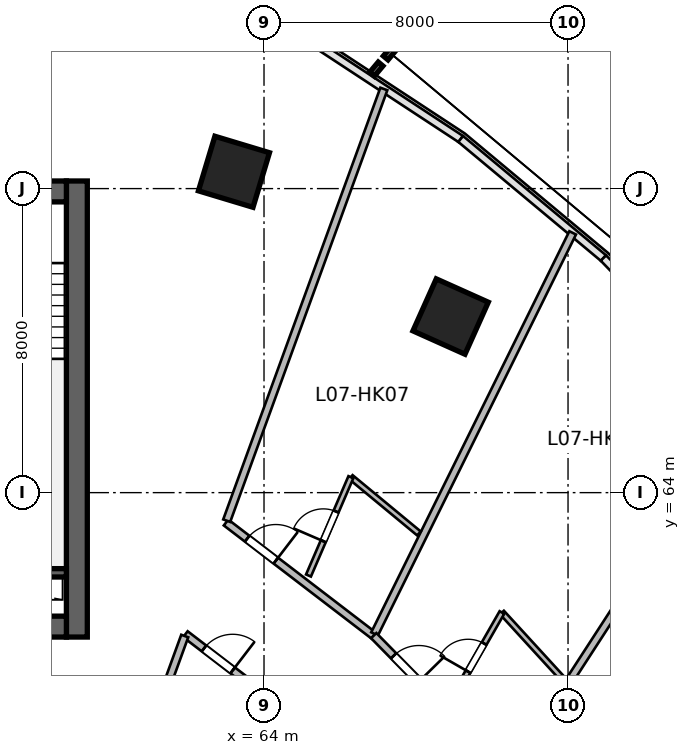
"""IFC4 building model, lengths in metres.
Left out: names, types, materials, properties, quantities, classifications, styles, units other than length and angle.
Written with IfcOpenShell. Run it as: python <this file> out.ifc"""

import sys

from ifc_helpers import new_model, si_unit, direction, frame, frame_2d, origin, origin_2d, place, context, subcontext, project, spatial, rectangle, extrude, source, transform, mapped, element, fill, save


model = new_model("IFC4")
c1 = context("Model", 3, precision=1e-05, world=origin(), true_north=direction((0.0, 1.0)))
c2 = subcontext(c1, "Body", "Model", "MODEL_VIEW")
j1 = project(units=[si_unit("LENGTHUNIT", "METRE"), si_unit("PLANEANGLEUNIT", "RADIAN")], contexts=[c1])
p1 = place(None, origin())
s1 = spatial("IfcSite", under=j1, at=p1, CompositionType="ELEMENT")
p2 = place(p1, origin())
s2 = spatial("IfcBuilding", under=s1, at=p2, CompositionType="ELEMENT")
p3 = place(p2, frame((0.0, 0.0, 39.0)))
s3 = spatial("IfcBuildingStorey", under=s2, at=p3, CompositionType="ELEMENT", Elevation=39.0)
m1 = source(origin(), c2, "Body", "SweptSolid", [
    extrude(rectangle(XDim=12.0, YDim=0.55, at=frame_2d((6.0, 0.0))), origin(), (0.0, 0.0, 1.0), 3.6),
])
p4 = place(p3, frame((59.075, 60.2, 0.0), z_axis=(0.0, 0.0, 1.0), x_axis=(0.0, 1.0, 0.0)))
e1 = element("IfcWall", 1, at=p4, inside=s3, PredefinedType="SHEAR", context=c2, shape_type="MappedRepresentation", body=[
    mapped(m1, transform((0.0, 0.0, 0.0), scale=1.0)),
])
m2 = source(origin(), c2, "Body", "SweptSolid", [
    extrude(rectangle(XDim=21.6, YDim=0.55, at=frame_2d((10.8, 0.0))), origin(), (0.0, 0.0, 1.0), 3.6),
])
p5 = place(p3, frame((37.2, 60.475, 0.0), z_axis=(0.0, 0.0, 1.0), x_axis=(1.0, 0.0, 0.0)))
e2 = element("IfcWall", 2, at=p5, inside=s3, PredefinedType="SHEAR", context=c2, shape_type="MappedRepresentation", body=[
    mapped(m2, transform((0.0, 0.0, 0.0), scale=1.0)),
])
p6 = place(p5, frame((1.1, 0.0, 0.0)))
e3 = element("IfcOpeningElement", 3, at=p6, cuts=e2, PredefinedType="OPENING", context=c2, shape_type="SweptSolid", body=[
    extrude(rectangle(XDim=1.15, YDim=2.15, at=frame_2d((0.575, 1.075))), frame((0.0, 0.285, 0.0), z_axis=(0.0, -1.0, 0.0), x_axis=(1.0, 0.0, 0.0)), (0.0, 0.0, 1.0), 0.57),
])
p7 = place(p5, frame((19.5, 0.0, 0.0)))
e4 = element("IfcOpeningElement", 4, at=p7, cuts=e2, PredefinedType="OPENING", context=c2, shape_type="SweptSolid", body=[
    extrude(rectangle(XDim=0.9, YDim=2.1, at=frame_2d((0.45, 1.05))), frame((0.0, 0.285, 0.0), z_axis=(0.0, -1.0, 0.0), x_axis=(1.0, 0.0, 0.0)), (0.0, 0.0, 1.0), 0.57),
])
p8 = place(p5, frame((12.02, 0.0, 0.0)))
e5 = element("IfcOpeningElement", 5, at=p8, cuts=e2, PredefinedType="OPENING", context=c2, shape_type="SweptSolid", body=[
    extrude(rectangle(XDim=1.6, YDim=2.15, at=frame_2d((0.8, 1.075))), frame((0.0, 0.285, 0.0), z_axis=(0.0, -1.0, 0.0), x_axis=(1.0, 0.0, 0.0)), (0.0, 0.0, 1.0), 0.57),
])
p9 = place(p3, frame((37.2, 71.925, 0.0), z_axis=(0.0, 0.0, 1.0), x_axis=(1.0, 0.0, 0.0)))
e6 = element("IfcWall", 6, at=p9, inside=s3, PredefinedType="SHEAR", context=c2, shape_type="MappedRepresentation", body=[
    mapped(m2, transform((0.0, 0.0, 0.0), scale=1.0)),
])
p10 = place(p9, frame((1.2, 0.0, 0.0)))
e7 = element("IfcOpeningElement", 7, at=p10, cuts=e6, PredefinedType="OPENING", context=c2, shape_type="SweptSolid", body=[
    extrude(rectangle(XDim=0.9, YDim=2.1, at=frame_2d((0.45, 1.05))), frame((0.0, 0.285, 0.0), z_axis=(0.0, -1.0, 0.0), x_axis=(1.0, 0.0, 0.0)), (0.0, 0.0, 1.0), 0.57),
])
p11 = place(p9, frame((14.7, 0.0, 0.0)))
e8 = element("IfcOpeningElement", 8, at=p11, cuts=e6, PredefinedType="OPENING", context=c2, shape_type="SweptSolid", body=[
    extrude(rectangle(XDim=1.2, YDim=2.15, at=frame_2d((0.6, 1.075))), frame((0.0, 0.285, 0.0), z_axis=(0.0, -1.0, 0.0), x_axis=(1.0, 0.0, 0.0)), (0.0, 0.0, 1.0), 0.57),
])
p12 = place(p9, frame((4.15, 0.0, 0.0)))
e9 = element("IfcOpeningElement", 9, at=p12, cuts=e6, PredefinedType="OPENING", context=c2, shape_type="SweptSolid", body=[
    extrude(rectangle(XDim=1.3, YDim=2.15, at=frame_2d((0.65, 1.075))), frame((0.0, 0.285, 0.0), z_axis=(0.0, -1.0, 0.0), x_axis=(1.0, 0.0, 0.0)), (0.0, 0.0, 1.0), 0.57),
])
p13 = place(p9, frame((7.1, 0.0, 0.0)))
e10 = element("IfcOpeningElement", 10, at=p13, cuts=e6, PredefinedType="OPENING", context=c2, shape_type="SweptSolid", body=[
    extrude(rectangle(XDim=0.9, YDim=2.1, at=frame_2d((0.45, 1.05))), frame((0.0, 0.285, 0.0), z_axis=(0.0, -1.0, 0.0), x_axis=(1.0, 0.0, 0.0)), (0.0, 0.0, 1.0), 0.57),
])
m3 = source(origin(), c2, "Body", "SweptSolid", [
    extrude(rectangle(XDim=3.27, YDim=0.22, at=frame_2d((1.635, 0.0))), origin(), (0.0, 0.0, 1.0), 3.6),
])
p14 = place(p3, frame((55.53, 61.89, 0.0), z_axis=(0.0, 0.0, 1.0), x_axis=(1.0, 0.0, 0.0)))
e11 = element("IfcWall", 11, at=p14, inside=s3, PredefinedType="SHEAR", context=c2, shape_type="MappedRepresentation", body=[
    mapped(m3, transform((0.0, 0.0, 0.0), scale=1.0)),
])
m4 = source(origin(), c2, "Body", "SweptSolid", [
    extrude(rectangle(XDim=1.5, YDim=1.5, at=origin_2d()), origin(), (0.0, 0.0, 1.0), 3.6),
])
for number, where, z_axis, x_axis in (
    (12, (63.209, 72.442, 0.0), (0.0, 0.0, 1.0), (0.289, 0.957, 0.0)),
    (13, (68.91, 68.633, 0.0), (0.0, 0.0, 1.0), (0.409, 0.912, 0.0)),
):
    element("IfcColumn", number, at=place(p3, frame(where, z_axis=z_axis, x_axis=x_axis)), inside=s3, PredefinedType="COLUMN", context=c2, shape_type="MappedRepresentation", body=[
        mapped(m4, transform((0.0, 0.0, 0.0), scale=1.0)),
    ])
m5 = source(origin(), c2, "Body", "SweptSolid", [
    extrude(rectangle(XDim=4.895, YDim=0.195, at=frame_2d((2.447, 0.0))), origin(), (0.0, 0.0, 1.0), 3.36),
])
p15 = place(p3, frame((63.001, 63.214, 0.0), z_axis=(0.0, 0.0, 1.0), x_axis=(0.793896075849, -0.608053468661, 0.0)))
e14 = element("IfcWall", 14, at=p15, inside=s3, PredefinedType="PARTITIONING", context=c2, shape_type="MappedRepresentation", body=[
    mapped(m5, transform((0.0, 0.0, 0.0), scale=1.0)),
])
p16 = place(p15, frame((0.7, 0.0, 0.0)))
e15 = element("IfcOpeningElement", 15, at=p16, cuts=e14, PredefinedType="OPENING", context=c2, shape_type="SweptSolid", body=[
    extrude(rectangle(XDim=0.95, YDim=2.15, at=frame_2d((0.475, 1.075))), frame((0.0, 0.107, 0.0), z_axis=(0.0, -1.0, 0.0), x_axis=(1.0, 0.0, 0.0)), (0.0, 0.0, 1.0), 0.215),
])
m6 = source(origin(), c2, "Body", "SweptSolid", [
    extrude(rectangle(XDim=12.088, YDim=0.195, at=frame_2d((6.044, 0.0))), origin(), (0.0, 0.0, 1.0), 3.36),
])
p17 = place(p3, frame((63.019, 63.262, 0.0), z_axis=(0.0, 0.0, 1.0), x_axis=(0.34203007529, 0.939689005787, 0.0)))
e16 = element("IfcWall", 16, at=p17, inside=s3, PredefinedType="PARTITIONING", context=c2, shape_type="MappedRepresentation", body=[
    mapped(m6, transform((0.0, 0.0, 0.0), scale=1.0)),
])
m7 = source(origin(), c2, "Body", "SweptSolid", [
    extrude(rectangle(XDim=11.77, YDim=0.195, at=frame_2d((5.885, 0.0))), origin(), (0.0, 0.0, 1.0), 3.36),
])
p18 = place(p3, frame((66.909, 60.282, 0.0), z_axis=(0.0, 0.0, 1.0), x_axis=(0.44286060326, 0.896590478468, 0.0)))
e17 = element("IfcWall", 17, at=p18, inside=s3, PredefinedType="PARTITIONING", context=c2, shape_type="MappedRepresentation", body=[
    mapped(m7, transform((0.0, 0.0, 0.0), scale=1.0)),
])
m8 = source(origin(), c2, "Body", "SweptSolid", [
    extrude(rectangle(XDim=2.324, YDim=0.14, at=frame_2d((1.162, 0.0))), origin(), (0.0, 0.0, 1.0), 3.36),
])
p19 = place(p3, frame((66.286, 64.407, 0.0), z_axis=(0.0, 0.0, 1.0), x_axis=(0.770746444956, -0.637141991701, 0.0)))
e18 = element("IfcWall", 18, at=p19, inside=s3, PredefinedType="PARTITIONING", context=c2, shape_type="MappedRepresentation", body=[
    mapped(m8, transform((0.0, 0.0, 0.0), scale=1.0)),
])
m9 = source(origin(), c2, "Body", "SweptSolid", [
    extrude(rectangle(XDim=2.818, YDim=0.14, at=frame_2d((1.409, 0.0))), origin(), (0.0, 0.0, 1.0), 3.36),
])
p20 = place(p3, frame((65.17, 61.819, 0.0), z_axis=(0.0, 0.0, 1.0), x_axis=(0.395894859341, 0.918295845764, 0.0)))
e19 = element("IfcWall", 19, at=p20, inside=s3, PredefinedType="PARTITIONING", context=c2, shape_type="MappedRepresentation", body=[
    mapped(m9, transform((0.0, 0.0, 0.0), scale=1.0)),
])
p21 = place(p20, frame((0.984, 0.0, 0.0)))
e20 = element("IfcOpeningElement", 20, at=p21, cuts=e19, PredefinedType="OPENING", context=c2, shape_type="SweptSolid", body=[
    extrude(rectangle(XDim=0.85, YDim=2.05, at=frame_2d((0.425, 1.025))), frame((0.0, 0.08, 0.0), z_axis=(0.0, -1.0, 0.0), x_axis=(1.0, 0.0, 0.0)), (0.0, 0.0, 1.0), 0.16),
])
m10 = source(origin(), c2, "Body", "SweptSolid", [
    extrude(rectangle(XDim=4.546, YDim=0.195, at=frame_2d((2.273, 0.0))), origin(), (0.0, 0.0, 1.0), 3.36),
])
p22 = place(p3, frame((61.931, 60.275, 0.0), z_axis=(0.0, 0.0, 1.0), x_axis=(0.793907931297, -0.608037989457, 0.0)))
e21 = element("IfcWall", 21, at=p22, inside=s3, PredefinedType="PARTITIONING", context=c2, shape_type="MappedRepresentation", body=[
    mapped(m10, transform((0.0, 0.0, 0.0), scale=1.0)),
])
p23 = place(p22, frame((0.616, 0.0, 0.0)))
e22 = element("IfcOpeningElement", 22, at=p23, cuts=e21, PredefinedType="OPENING", context=c2, shape_type="SweptSolid", body=[
    extrude(rectangle(XDim=0.95, YDim=2.15, at=frame_2d((0.475, 1.075))), frame((0.0, 0.107, 0.0), z_axis=(0.0, -1.0, 0.0), x_axis=(1.0, 0.0, 0.0)), (0.0, 0.0, 1.0), 0.215),
])
m11 = source(origin(), c2, "Body", "SweptSolid", [
    extrude(rectangle(XDim=12.196, YDim=0.195, at=frame_2d((6.098, 0.0))), origin(), (0.0, 0.0, 1.0), 3.36),
])
p24 = place(p3, frame((57.742, 48.766, 0.0), z_axis=(0.0, 0.0, 1.0), x_axis=(0.342022711534, 0.939691686031, 0.0)))
e23 = element("IfcWall", 23, at=p24, inside=s3, PredefinedType="PARTITIONING", context=c2, shape_type="MappedRepresentation", body=[
    mapped(m11, transform((0.0, 0.0, 0.0), scale=1.0)),
])
m12 = source(origin(), c2, "Body", "SweptSolid", [
    extrude(rectangle(XDim=5.087, YDim=0.195, at=frame_2d((2.543, 0.0))), origin(), (0.0, 0.0, 1.0), 3.36),
])
p25 = place(p3, frame((66.887, 60.238, 0.0), z_axis=(0.0, 0.0, 1.0), x_axis=(0.700428330775, -0.7137227427, 0.0)))
e24 = element("IfcWall", 24, at=p25, inside=s3, PredefinedType="PARTITIONING", context=c2, shape_type="MappedRepresentation", body=[
    mapped(m12, transform((0.0, 0.0, 0.0), scale=1.0)),
])
p26 = place(p25, frame((0.746, 0.0, 0.0)))
e25 = element("IfcOpeningElement", 25, at=p26, cuts=e24, PredefinedType="OPENING", context=c2, shape_type="SweptSolid", body=[
    extrude(rectangle(XDim=0.95, YDim=2.15, at=frame_2d((0.475, 1.075))), frame((0.0, 0.107, 0.0), z_axis=(0.0, -1.0, 0.0), x_axis=(1.0, 0.0, 0.0)), (0.0, 0.0, 1.0), 0.215),
])
m13 = source(origin(), c2, "Body", "SweptSolid", [
    extrude(rectangle(XDim=11.403, YDim=0.195, at=frame_2d((5.701, 0.0))), origin(), (0.0, 0.0, 1.0), 3.36),
])
p27 = place(p3, frame((70.477, 56.647, 0.0), z_axis=(0.0, 0.0, 1.0), x_axis=(0.544246090008, 0.838925618581, 0.0)))
e26 = element("IfcWall", 26, at=p27, inside=s3, PredefinedType="PARTITIONING", context=c2, shape_type="MappedRepresentation", body=[
    mapped(m13, transform((0.0, 0.0, 0.0), scale=1.0)),
])
m14 = source(origin(), c2, "Body", "SweptSolid", [
    extrude(rectangle(XDim=2.416, YDim=0.14, at=frame_2d((1.208, 0.0))), origin(), (0.0, 0.0, 1.0), 3.36),
])
p28 = place(p3, frame((70.26, 60.846, 0.0), z_axis=(0.0, 0.0, 1.0), x_axis=(0.675399637907, -0.737451916476, 0.0)))
e27 = element("IfcWall", 27, at=p28, inside=s3, PredefinedType="PARTITIONING", context=c2, shape_type="MappedRepresentation", body=[
    mapped(m14, transform((0.0, 0.0, 0.0), scale=1.0)),
])
m15 = source(origin(), c2, "Body", "SweptSolid", [
    extrude(rectangle(XDim=2.732, YDim=0.14, at=frame_2d((1.366, 0.0))), origin(), (0.0, 0.0, 1.0), 3.36),
])
p29 = place(p3, frame((68.902, 58.476, 0.0), z_axis=(0.0, 0.0, 1.0), x_axis=(0.497254966372, 0.867604459658, 0.0)))
e28 = element("IfcWall", 28, at=p29, inside=s3, PredefinedType="PARTITIONING", context=c2, shape_type="MappedRepresentation", body=[
    mapped(m15, transform((0.0, 0.0, 0.0), scale=1.0)),
])
p30 = place(p29, frame((0.941, 0.0, 0.0)))
e29 = element("IfcOpeningElement", 29, at=p30, cuts=e28, PredefinedType="OPENING", context=c2, shape_type="SweptSolid", body=[
    extrude(rectangle(XDim=0.85, YDim=2.05, at=frame_2d((0.425, 1.025))), frame((0.0, 0.08, 0.0), z_axis=(0.0, -1.0, 0.0), x_axis=(1.0, 0.0, 0.0)), (0.0, 0.0, 1.0), 0.16),
])
m16 = source(origin(), c2, "Body", "SweptSolid", [
    extrude(rectangle(XDim=0.95, YDim=2.15, at=frame_2d((0.475, 1.075))), frame((0.0, 0.025, 0.0), z_axis=(0.0, -1.0, 0.0), x_axis=(1.0, 0.0, 0.0)), (0.0, 0.0, 1.0), 0.05),
])
p31 = place(p16, origin())
e30 = element("IfcDoor", 30, at=p31, inside=s3, OperationType="SINGLE_SWING_RIGHT", PredefinedType="DOOR", context=c2, shape_type="MappedRepresentation", body=[
    mapped(m16, transform((0.0, 0.0, 0.0), scale=1.0)),
])
fill(e15, e30)
m17 = source(origin(), c2, "Body", "SweptSolid", [
    extrude(rectangle(XDim=0.85, YDim=2.05, at=frame_2d((0.425, 1.025))), frame((0.0, 0.025, 0.0), z_axis=(0.0, -1.0, 0.0), x_axis=(1.0, 0.0, 0.0)), (0.0, 0.0, 1.0), 0.05),
])
p32 = place(p21, origin())
e31 = element("IfcDoor", 31, at=p32, inside=s3, OperationType="SINGLE_SWING_LEFT", PredefinedType="DOOR", context=c2, shape_type="MappedRepresentation", body=[
    mapped(m17, transform((0.0, 0.0, 0.0), scale=1.0)),
])
fill(e20, e31)
p33 = place(p23, origin())
e32 = element("IfcDoor", 32, at=p33, inside=s3, OperationType="SINGLE_SWING_RIGHT", PredefinedType="DOOR", context=c2, shape_type="MappedRepresentation", body=[
    mapped(m16, transform((0.0, 0.0, 0.0), scale=1.0)),
])
fill(e22, e32)
p34 = place(p26, origin())
e33 = element("IfcDoor", 33, at=p34, inside=s3, OperationType="SINGLE_SWING_RIGHT", PredefinedType="DOOR", context=c2, shape_type="MappedRepresentation", body=[
    mapped(m16, transform((0.0, 0.0, 0.0), scale=1.0)),
])
fill(e25, e33)
p35 = place(p30, origin())
e34 = element("IfcDoor", 34, at=p35, inside=s3, OperationType="SINGLE_SWING_LEFT", PredefinedType="DOOR", context=c2, shape_type="MappedRepresentation", body=[
    mapped(m17, transform((0.0, 0.0, 0.0), scale=1.0)),
])
fill(e29, e34)
save(model, sys.argv[1])
